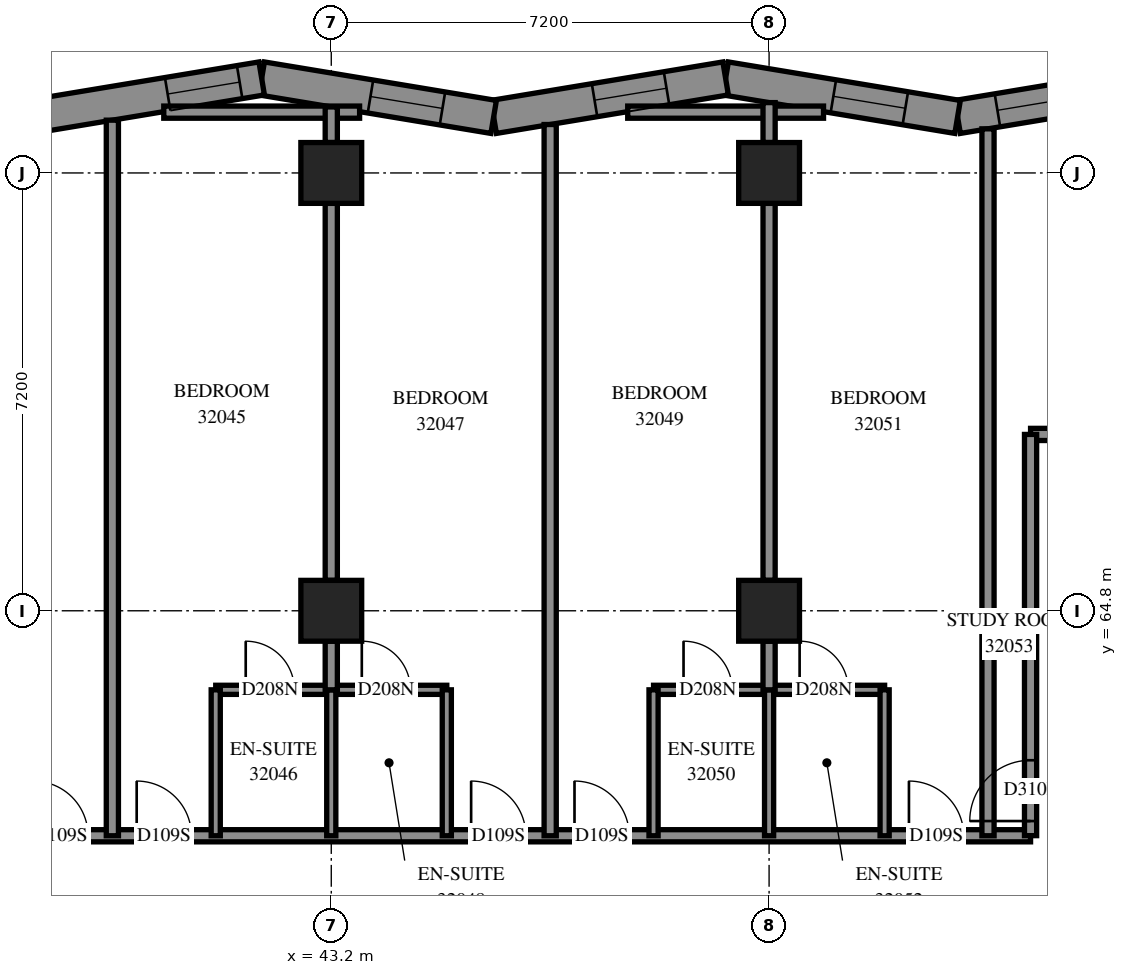
"""IFC4 building model, lengths in metres.
Left out: names, types, materials, properties, quantities, classifications, styles, units other than length and angle.
Written with IfcOpenShell. Run it as: python <this file> out.ifc"""

import sys

from ifc_helpers import new_model, si_unit, direction, frame, frame_2d, origin, origin_2d, place, context, subcontext, project, spatial, polyline, rectangle, outline, extrude, element, fill, save


model = new_model("IFC4")
c1 = context("Model", 3, precision=1e-05, world=origin(), true_north=direction((0.0, 1.0)))
c2 = subcontext(c1, "Body", "Model", "MODEL_VIEW")
j1 = project(units=[si_unit("LENGTHUNIT", "METRE"), si_unit("PLANEANGLEUNIT", "RADIAN")], contexts=[c1])
p1 = place(None, origin())
s1 = spatial("IfcSite", under=j1, at=p1, CompositionType="ELEMENT")
p2 = place(p1, origin())
s2 = spatial("IfcBuilding", under=s1, at=p2, CompositionType="ELEMENT")
p3 = place(p2, frame((0.0, 0.0, 118.6)))
s3 = spatial("IfcBuildingStorey", under=s2, at=p3, CompositionType="ELEMENT", Elevation=118.6)
for number, where, z_axis, x_axis in (
    (1, (43.2, 64.8, 0.0), (0.0, 0.0, 1.0), (1.0, 0.0, 0.0)),
    (2, (43.2, 72.0, 0.0), (0.0, 0.0, 1.0), (1.0, 0.0, 0.0)),
    (3, (50.4, 64.8, 0.0), (0.0, 0.0, 1.0), (1.0, 0.0, 0.0)),
    (4, (50.4, 72.0, 0.0), (0.0, 0.0, 1.0), (1.0, 0.0, 0.0)),
):
    element("IfcColumn", number, at=place(p3, frame(where, z_axis=z_axis, x_axis=x_axis)), inside=s3, PredefinedType="COLUMN", context=c2, shape_type="SweptSolid", body=[
        extrude(rectangle(XDim=1.0, YDim=1.0, at=origin_2d()), origin(), (0.0, 0.0, 1.0), 3.1),
    ])
p4 = place(p3, frame((57.315, 73.554, 0.0), z_axis=(0.0, 0.0, 1.0), x_axis=(-0.9865110911, -0.1636944324, 0.0)))
e5 = element("IfcWall", 5, at=p4, inside=s3, PredefinedType="SOLIDWALL", context=c2, shape_type="SweptSolid", body=[
    extrude(outline(polyline([(-0.046, -0.275), (3.821, -0.275), (3.913, 0.275), (0.046, 0.275), (-0.046, -0.275)])), origin(), (0.0, 0.0, 1.0), 3.1),
])
p5 = place(p4, frame((1.903, 0.0, 0.5)))
e6 = element("IfcOpeningElement", 6, at=p5, cuts=e5, PredefinedType="OPENING", context=c2, shape_type="SweptSolid", body=[
    extrude(rectangle(XDim=1.3, YDim=2.45, at=frame_2d((0.65, 1.225))), frame((0.0, 0.285, 0.0), z_axis=(0.0, -1.0, 0.0), x_axis=(1.0, 0.0, 0.0)), (0.0, 0.0, 1.0), 0.57),
])
p6 = place(p4, frame((0.315, 0.0, 0.5)))
e7 = element("IfcOpeningElement", 7, at=p6, cuts=e5, PredefinedType="OPENING", context=c2, shape_type="SweptSolid", body=[
    extrude(rectangle(XDim=1.2, YDim=2.45, at=frame_2d((0.6, 1.225))), frame((0.0, 0.285, 0.0), z_axis=(0.0, -1.0, 0.0), x_axis=(1.0, 0.0, 0.0)), (0.0, 0.0, 1.0), 0.57),
])
p7 = place(p3, frame((53.5, 72.921, 0.0), z_axis=(0.0, 0.0, 1.0), x_axis=(-0.9865110911, 0.1636944324, 0.0)))
e8 = element("IfcWall", 8, at=p7, inside=s3, PredefinedType="SOLIDWALL", context=c2, shape_type="SweptSolid", body=[
    extrude(outline(polyline([(0.046, -0.275), (3.913, -0.275), (3.821, 0.275), (-0.046, 0.275), (0.046, -0.275)])), origin(), (0.0, 0.0, 1.0), 3.1),
])
p8 = place(p7, frame((0.871, 0.0, 0.5)))
e9 = element("IfcOpeningElement", 9, at=p8, cuts=e8, PredefinedType="OPENING", context=c2, shape_type="SweptSolid", body=[
    extrude(rectangle(XDim=1.2, YDim=2.45, at=frame_2d((0.6, 1.225))), frame((0.0, 0.285, 0.0), z_axis=(0.0, -1.0, 0.0), x_axis=(1.0, 0.0, 0.0)), (0.0, 0.0, 1.0), 0.57),
])
p9 = place(p3, frame((49.685, 73.554, 0.0), z_axis=(0.0, 0.0, 1.0), x_axis=(-0.9865110911, -0.1636944324, 0.0)))
e10 = element("IfcWall", 10, at=p9, inside=s3, PredefinedType="SOLIDWALL", context=c2, shape_type="SweptSolid", body=[
    extrude(outline(polyline([(-0.046, -0.275), (3.821, -0.275), (3.913, 0.275), (0.046, 0.275), (-0.046, -0.275)])), origin(), (0.0, 0.0, 1.0), 3.1),
])
p10 = place(p9, frame((0.985, 0.0, 0.5)))
e11 = element("IfcOpeningElement", 11, at=p10, cuts=e10, PredefinedType="OPENING", context=c2, shape_type="SweptSolid", body=[
    extrude(rectangle(XDim=1.2, YDim=2.45, at=frame_2d((0.6, 1.225))), frame((0.0, 0.285, 0.0), z_axis=(0.0, -1.0, 0.0), x_axis=(1.0, 0.0, 0.0)), (0.0, 0.0, 1.0), 0.57),
])
p11 = place(p3, frame((45.87, 72.921, 0.0), z_axis=(0.0, 0.0, 1.0), x_axis=(-0.9865110911, 0.1636944324, 0.0)))
e12 = element("IfcWall", 12, at=p11, inside=s3, PredefinedType="SOLIDWALL", context=c2, shape_type="SweptSolid", body=[
    extrude(outline(polyline([(0.046, -0.275), (3.913, -0.275), (3.821, 0.275), (-0.046, 0.275), (0.046, -0.275)])), origin(), (0.0, 0.0, 1.0), 3.1),
])
p12 = place(p11, frame((0.854, 0.0, 0.5)))
e13 = element("IfcOpeningElement", 13, at=p12, cuts=e12, PredefinedType="OPENING", context=c2, shape_type="SweptSolid", body=[
    extrude(rectangle(XDim=1.2, YDim=2.45, at=frame_2d((0.6, 1.225))), frame((0.0, 0.285, 0.0), z_axis=(0.0, -1.0, 0.0), x_axis=(1.0, 0.0, 0.0)), (0.0, 0.0, 1.0), 0.57),
])
p13 = place(p3, frame((42.056, 73.554, 0.0), z_axis=(0.0, 0.0, 1.0), x_axis=(-0.9865110911, -0.1636944324, 0.0)))
e14 = element("IfcWall", 14, at=p13, inside=s3, PredefinedType="SOLIDWALL", context=c2, shape_type="SweptSolid", body=[
    extrude(outline(polyline([(-0.046, -0.275), (3.821, -0.275), (3.913, 0.275), (0.046, 0.275), (-0.046, -0.275)])), origin(), (0.0, 0.0, 1.0), 3.1),
])
p14 = place(p13, frame((0.367, 0.0, 0.5)))
e15 = element("IfcOpeningElement", 15, at=p14, cuts=e14, PredefinedType="OPENING", context=c2, shape_type="SweptSolid", body=[
    extrude(rectangle(XDim=1.2, YDim=2.45, at=frame_2d((0.6, 1.225))), frame((0.0, 0.285, 0.0), z_axis=(0.0, -1.0, 0.0), x_axis=(1.0, 0.0, 0.0)), (0.0, 0.0, 1.0), 0.57),
])
p15 = place(p3, frame((33.502, 61.1, 0.0), z_axis=(0.0, 0.0, 1.0), x_axis=(1.0, 0.0, 0.0)))
e16 = element("IfcWall", 16, at=p15, inside=s3, PredefinedType="PARTITIONING", context=c2, shape_type="SweptSolid", body=[
    extrude(rectangle(XDim=21.198, YDim=0.2, at=frame_2d((10.599, 0.0))), origin(), (0.0, 0.0, 1.0), 3.1),
])
p16 = place(p15, frame((4.798, 0.0, 0.0)))
e17 = element("IfcOpeningElement", 17, at=p16, cuts=e16, PredefinedType="OPENING", context=c2, shape_type="SweptSolid", body=[
    extrude(rectangle(XDim=0.9, YDim=2.1, at=frame_2d((0.45, 1.05))), frame((0.0, 0.11, 0.0), z_axis=(0.0, -1.0, 0.0), x_axis=(1.0, 0.0, 0.0)), (0.0, 0.0, 1.0), 0.22),
])
p17 = place(p15, frame((6.498, 0.0, 0.0)))
e18 = element("IfcOpeningElement", 18, at=p17, cuts=e16, PredefinedType="OPENING", context=c2, shape_type="SweptSolid", body=[
    extrude(rectangle(XDim=0.9, YDim=2.1, at=frame_2d((0.45, 1.05))), frame((0.0, 0.11, 0.0), z_axis=(0.0, -1.0, 0.0), x_axis=(1.0, 0.0, 0.0)), (0.0, 0.0, 1.0), 0.22),
])
p18 = place(p15, frame((11.998, 0.0, 0.0)))
e19 = element("IfcOpeningElement", 19, at=p18, cuts=e16, PredefinedType="OPENING", context=c2, shape_type="SweptSolid", body=[
    extrude(rectangle(XDim=0.9, YDim=2.1, at=frame_2d((0.45, 1.05))), frame((0.0, 0.11, 0.0), z_axis=(0.0, -1.0, 0.0), x_axis=(1.0, 0.0, 0.0)), (0.0, 0.0, 1.0), 0.22),
])
p19 = place(p15, frame((13.698, 0.0, 0.0)))
e20 = element("IfcOpeningElement", 20, at=p19, cuts=e16, PredefinedType="OPENING", context=c2, shape_type="SweptSolid", body=[
    extrude(rectangle(XDim=0.9, YDim=2.1, at=frame_2d((0.45, 1.05))), frame((0.0, 0.11, 0.0), z_axis=(0.0, -1.0, 0.0), x_axis=(1.0, 0.0, 0.0)), (0.0, 0.0, 1.0), 0.22),
])
p20 = place(p15, frame((19.198, 0.0, 0.0)))
e21 = element("IfcOpeningElement", 21, at=p20, cuts=e16, PredefinedType="OPENING", context=c2, shape_type="SweptSolid", body=[
    extrude(rectangle(XDim=0.9, YDim=2.1, at=frame_2d((0.45, 1.05))), frame((0.0, 0.11, 0.0), z_axis=(0.0, -1.0, 0.0), x_axis=(1.0, 0.0, 0.0)), (0.0, 0.0, 1.0), 0.22),
])
p21 = place(p3, frame((54.7, 67.7, 0.0), z_axis=(0.0, 0.0, 1.0), x_axis=(1.0, 0.0, 0.0)))
e22 = element("IfcWall", 22, at=p21, inside=s3, PredefinedType="PARTITIONING", context=c2, shape_type="SweptSolid", body=[
    extrude(rectangle(XDim=20.2, YDim=0.2, at=frame_2d((10.1, 0.0))), origin(), (0.0, 0.0, 1.0), 3.1),
])
p22 = place(p21, frame((5.2, 0.0, 0.0)))
e23 = element("IfcOpeningElement", 23, at=p22, cuts=e22, PredefinedType="OPENING", context=c2, shape_type="SweptSolid", body=[
    extrude(rectangle(XDim=0.9, YDim=2.1, at=frame_2d((0.45, 1.05))), frame((0.0, 0.11, 0.0), z_axis=(0.0, -1.0, 0.0), x_axis=(1.0, 0.0, 0.0)), (0.0, 0.0, 1.0), 0.22),
])
p23 = place(p21, frame((8.838, 0.0, 0.0)))
e24 = element("IfcOpeningElement", 24, at=p23, cuts=e22, PredefinedType="OPENING", context=c2, shape_type="SweptSolid", body=[
    extrude(rectangle(XDim=1.0, YDim=2.1, at=frame_2d((0.5, 1.05))), frame((0.0, 0.11, 0.0), z_axis=(0.0, -1.0, 0.0), x_axis=(1.0, 0.0, 0.0)), (0.0, 0.0, 1.0), 0.22),
])
p24 = place(p21, frame((14.1, 0.0, 0.0)))
e25 = element("IfcOpeningElement", 25, at=p24, cuts=e22, PredefinedType="OPENING", context=c2, shape_type="SweptSolid", body=[
    extrude(rectangle(XDim=0.9, YDim=2.1, at=frame_2d((0.45, 1.05))), frame((0.0, 0.11, 0.0), z_axis=(0.0, -1.0, 0.0), x_axis=(1.0, 0.0, 0.0)), (0.0, 0.0, 1.0), 0.22),
])
p25 = place(p3, frame((39.6, 61.1, 0.0), z_axis=(0.0, 0.0, 1.0), x_axis=(0.0, 1.0, 0.0)))
e26 = element("IfcWall", 26, at=p25, inside=s3, PredefinedType="PARTITIONING", context=c2, shape_type="SweptSolid", body=[
    extrude(rectangle(XDim=11.768, YDim=0.2, at=frame_2d((5.884, 0.0))), origin(), (0.0, 0.0, 1.0), 3.1),
])
p26 = place(p3, frame((46.8, 61.1, 0.0), z_axis=(0.0, 0.0, 1.0), x_axis=(0.0, 1.0, 0.0)))
e27 = element("IfcWall", 27, at=p26, inside=s3, PredefinedType="PARTITIONING", context=c2, shape_type="SweptSolid", body=[
    extrude(rectangle(XDim=11.697, YDim=0.2, at=frame_2d((5.848, 0.0))), origin(), (0.0, 0.0, 1.0), 3.1),
])
p27 = place(p3, frame((54.0, 61.1, 0.0), z_axis=(0.0, 0.0, 1.0), x_axis=(0.0, 1.0, 0.0)))
e28 = element("IfcWall", 28, at=p27, inside=s3, PredefinedType="PARTITIONING", context=c2, shape_type="SweptSolid", body=[
    extrude(rectangle(XDim=11.625, YDim=0.2, at=frame_2d((5.813, 0.0))), origin(), (0.0, 0.0, 1.0), 3.1),
])
p28 = place(p3, frame((54.7, 61.102, 0.0), z_axis=(0.0, 0.0, 1.0), x_axis=(0.0, 1.0, 0.0)))
e29 = element("IfcWall", 29, at=p28, inside=s3, PredefinedType="PARTITIONING", context=c2, shape_type="SweptSolid", body=[
    extrude(rectangle(XDim=6.598, YDim=0.2, at=frame_2d((3.299, 0.0))), origin(), (0.0, 0.0, 1.0), 3.1),
])
p29 = place(p28, frame((0.24, 0.0, 0.0)))
e30 = element("IfcOpeningElement", 30, at=p29, cuts=e29, PredefinedType="OPENING", context=c2, shape_type="SweptSolid", body=[
    extrude(rectangle(XDim=1.0, YDim=2.1, at=frame_2d((0.5, 1.05))), frame((0.0, 0.11, 0.0), z_axis=(0.0, -1.0, 0.0), x_axis=(1.0, 0.0, 0.0)), (0.0, 0.0, 1.0), 0.22),
])
for number, where, z_axis, x_axis in (
    (31, (43.2, 65.3, 0.0), (0.0, 0.0, 1.0), (0.0, 1.0, 0.0)),
    (32, (50.4, 65.3, 0.0), (0.0, 0.0, 1.0), (0.0, 1.0, 0.0)),
):
    element("IfcWall", number, at=place(p3, frame(where, z_axis=z_axis, x_axis=x_axis)), inside=s3, PredefinedType="PARTITIONING", context=c2, shape_type="SweptSolid", body=[
        extrude(rectangle(XDim=6.2, YDim=0.2, at=frame_2d((3.1, 0.0))), origin(), (0.0, 0.0, 1.0), 3.1),
    ])
p30 = place(p3, frame((41.3, 63.5, 0.0), z_axis=(0.0, 0.0, 1.0), x_axis=(1.0, 0.0, 0.0)))
e33 = element("IfcWall", 33, at=p30, inside=s3, PredefinedType="PARTITIONING", context=c2, shape_type="SweptSolid", body=[
    extrude(rectangle(XDim=3.8, YDim=0.15, at=frame_2d((1.9, 0.0))), origin(), (0.0, 0.0, 1.0), 3.1),
])
p31 = place(p30, frame((0.493, 0.0, 0.0)))
e34 = element("IfcOpeningElement", 34, at=p31, cuts=e33, PredefinedType="OPENING", context=c2, shape_type="SweptSolid", body=[
    extrude(rectangle(XDim=0.8, YDim=2.1, at=frame_2d((0.4, 1.05))), frame((0.0, 0.085, 0.0), z_axis=(0.0, -1.0, 0.0), x_axis=(1.0, 0.0, 0.0)), (0.0, 0.0, 1.0), 0.17),
])
p32 = place(p30, frame((2.402, 0.0, 0.0)))
e35 = element("IfcOpeningElement", 35, at=p32, cuts=e33, PredefinedType="OPENING", context=c2, shape_type="SweptSolid", body=[
    extrude(rectangle(XDim=0.8, YDim=2.1, at=frame_2d((0.4, 1.05))), frame((0.0, 0.085, 0.0), z_axis=(0.0, -1.0, 0.0), x_axis=(1.0, 0.0, 0.0)), (0.0, 0.0, 1.0), 0.17),
])
p33 = place(p3, frame((48.5, 63.5, 0.0), z_axis=(0.0, 0.0, 1.0), x_axis=(1.0, 0.0, 0.0)))
e36 = element("IfcWall", 36, at=p33, inside=s3, PredefinedType="PARTITIONING", context=c2, shape_type="SweptSolid", body=[
    extrude(rectangle(XDim=3.8, YDim=0.15, at=frame_2d((1.9, 0.0))), origin(), (0.0, 0.0, 1.0), 3.1),
])
p34 = place(p33, frame((0.493, 0.0, 0.0)))
e37 = element("IfcOpeningElement", 37, at=p34, cuts=e36, PredefinedType="OPENING", context=c2, shape_type="SweptSolid", body=[
    extrude(rectangle(XDim=0.8, YDim=2.1, at=frame_2d((0.4, 1.05))), frame((0.0, 0.085, 0.0), z_axis=(0.0, -1.0, 0.0), x_axis=(1.0, 0.0, 0.0)), (0.0, 0.0, 1.0), 0.17),
])
p35 = place(p33, frame((2.402, 0.0, 0.0)))
e38 = element("IfcOpeningElement", 38, at=p35, cuts=e36, PredefinedType="OPENING", context=c2, shape_type="SweptSolid", body=[
    extrude(rectangle(XDim=0.8, YDim=2.1, at=frame_2d((0.4, 1.05))), frame((0.0, 0.085, 0.0), z_axis=(0.0, -1.0, 0.0), x_axis=(1.0, 0.0, 0.0)), (0.0, 0.0, 1.0), 0.17),
])
for number, where, z_axis, x_axis in (
    (39, (40.446, 73.0, 0.0), (0.0, 0.0, 1.0), (1.0, 0.0, 0.0)),
    (40, (48.075, 73.0, 0.0), (0.0, 0.0, 1.0), (1.0, 0.0, 0.0)),
):
    element("IfcWall", number, at=place(p3, frame(where, z_axis=z_axis, x_axis=x_axis)), inside=s3, PredefinedType="PARTITIONING", context=c2, shape_type="SweptSolid", body=[
        extrude(rectangle(XDim=3.22, YDim=0.2, at=frame_2d((1.61, 0.0))), origin(), (0.0, 0.0, 1.0), 3.1),
    ])
for number, where, z_axis, x_axis in (
    (41, (41.3, 61.1, 0.0), (0.0, 0.0, 1.0), (0.0, 1.0, 0.0)),
    (42, (43.2, 61.1, 0.0), (0.0, 0.0, 1.0), (0.0, 1.0, 0.0)),
    (43, (45.1, 61.1, 0.0), (0.0, 0.0, 1.0), (0.0, 1.0, 0.0)),
    (44, (48.5, 61.1, 0.0), (0.0, 0.0, 1.0), (0.0, 1.0, 0.0)),
    (45, (50.4, 61.1, 0.0), (0.0, 0.0, 1.0), (0.0, 1.0, 0.0)),
    (46, (52.3, 61.1, 0.0), (0.0, 0.0, 1.0), (0.0, 1.0, 0.0)),
):
    element("IfcWall", number, at=place(p3, frame(where, z_axis=z_axis, x_axis=x_axis)), inside=s3, PredefinedType="PARTITIONING", context=c2, shape_type="SweptSolid", body=[
        extrude(rectangle(XDim=2.4, YDim=0.15, at=frame_2d((1.2, 0.0))), origin(), (0.0, 0.0, 1.0), 3.1),
    ])
for number, where, z_axis, x_axis in (
    (47, (43.2, 63.5, 0.0), (0.0, 0.0, 1.0), (0.0, 1.0, 0.0)),
    (48, (50.4, 63.5, 0.0), (0.0, 0.0, 1.0), (0.0, 1.0, 0.0)),
):
    element("IfcWall", number, at=place(p3, frame(where, z_axis=z_axis, x_axis=x_axis)), inside=s3, PredefinedType="PARTITIONING", context=c2, shape_type="SweptSolid", body=[
        extrude(rectangle(XDim=0.8, YDim=0.2, at=frame_2d((0.4, 0.0))), origin(), (0.0, 0.0, 1.0), 3.1),
    ])
p36 = place(p3, frame((43.2, 72.5, 0.0), z_axis=(0.0, 0.0, 1.0), x_axis=(0.0, 1.0, 0.0)))
e49 = element("IfcWall", 49, at=p36, inside=s3, PredefinedType="PARTITIONING", context=c2, shape_type="SweptSolid", body=[
    extrude(rectangle(XDim=0.586, YDim=0.2, at=frame_2d((0.293, 0.0))), origin(), (0.0, 0.0, 1.0), 3.1),
])
p37 = place(p3, frame((50.4, 72.5, 0.0), z_axis=(0.0, 0.0, 1.0), x_axis=(0.0, 1.0, 0.0)))
e50 = element("IfcWall", 50, at=p37, inside=s3, PredefinedType="PARTITIONING", context=c2, shape_type="SweptSolid", body=[
    extrude(rectangle(XDim=0.657, YDim=0.2, at=frame_2d((0.329, 0.0))), origin(), (0.0, 0.0, 1.0), 3.1),
])
p38 = place(p5, origin())
e51 = element("IfcWindow", 51, at=p38, inside=s3, PartitioningType="SINGLE_PANEL", PredefinedType="WINDOW", context=c2, shape_type="SweptSolid", body=[
    extrude(rectangle(XDim=1.3, YDim=2.45, at=frame_2d((0.65, 1.225))), frame((0.0, 0.155, 0.0), z_axis=(0.0, -1.0, 0.0), x_axis=(1.0, 0.0, 0.0)), (0.0, 0.0, 1.0), 0.06),
])
fill(e6, e51)
p39 = place(p8, origin())
e52 = element("IfcWindow", 52, at=p39, inside=s3, PartitioningType="SINGLE_PANEL", PredefinedType="WINDOW", context=c2, shape_type="SweptSolid", body=[
    extrude(rectangle(XDim=1.2, YDim=2.45, at=frame_2d((0.6, 1.225))), frame((0.0, 0.155, 0.0), z_axis=(0.0, -1.0, 0.0), x_axis=(1.0, 0.0, 0.0)), (0.0, 0.0, 1.0), 0.06),
])
fill(e9, e52)
p40 = place(p10, origin())
e53 = element("IfcWindow", 53, at=p40, inside=s3, PartitioningType="SINGLE_PANEL", PredefinedType="WINDOW", context=c2, shape_type="SweptSolid", body=[
    extrude(rectangle(XDim=1.2, YDim=2.45, at=frame_2d((0.6, 1.225))), frame((0.0, 0.155, 0.0), z_axis=(0.0, -1.0, 0.0), x_axis=(1.0, 0.0, 0.0)), (0.0, 0.0, 1.0), 0.06),
])
fill(e11, e53)
p41 = place(p12, origin())
e54 = element("IfcWindow", 54, at=p41, inside=s3, PartitioningType="SINGLE_PANEL", PredefinedType="WINDOW", context=c2, shape_type="SweptSolid", body=[
    extrude(rectangle(XDim=1.2, YDim=2.45, at=frame_2d((0.6, 1.225))), frame((0.0, 0.155, 0.0), z_axis=(0.0, -1.0, 0.0), x_axis=(1.0, 0.0, 0.0)), (0.0, 0.0, 1.0), 0.06),
])
fill(e13, e54)
p42 = place(p14, origin())
e55 = element("IfcWindow", 55, at=p42, inside=s3, PartitioningType="SINGLE_PANEL", PredefinedType="WINDOW", context=c2, shape_type="SweptSolid", body=[
    extrude(rectangle(XDim=1.2, YDim=2.45, at=frame_2d((0.6, 1.225))), frame((0.0, 0.155, 0.0), z_axis=(0.0, -1.0, 0.0), x_axis=(1.0, 0.0, 0.0)), (0.0, 0.0, 1.0), 0.06),
])
fill(e15, e55)
p43 = place(p16, origin())
e56 = element("IfcDoor", 56, at=p43, inside=s3, OperationType="SINGLE_SWING_RIGHT", PredefinedType="DOOR", context=c2, shape_type="SweptSolid", body=[
    extrude(rectangle(XDim=0.9, YDim=2.1, at=frame_2d((0.45, 1.05))), frame((0.0, 0.025, 0.0), z_axis=(0.0, -1.0, 0.0), x_axis=(1.0, 0.0, 0.0)), (0.0, 0.0, 1.0), 0.05),
])
fill(e17, e56)
p44 = place(p17, origin())
e57 = element("IfcDoor", 57, at=p44, inside=s3, OperationType="SINGLE_SWING_LEFT", PredefinedType="DOOR", context=c2, shape_type="SweptSolid", body=[
    extrude(rectangle(XDim=0.9, YDim=2.1, at=frame_2d((0.45, 1.05))), frame((0.0, 0.025, 0.0), z_axis=(0.0, -1.0, 0.0), x_axis=(1.0, 0.0, 0.0)), (0.0, 0.0, 1.0), 0.05),
])
fill(e18, e57)
p45 = place(p31, origin())
e58 = element("IfcDoor", 58, at=p45, inside=s3, OperationType="SINGLE_SWING_RIGHT", PredefinedType="DOOR", context=c2, shape_type="SweptSolid", body=[
    extrude(rectangle(XDim=0.8, YDim=2.1, at=frame_2d((0.4, 1.05))), frame((0.0, 0.025, 0.0), z_axis=(0.0, -1.0, 0.0), x_axis=(1.0, 0.0, 0.0)), (0.0, 0.0, 1.0), 0.05),
])
fill(e34, e58)
p46 = place(p18, origin())
e59 = element("IfcDoor", 59, at=p46, inside=s3, OperationType="SINGLE_SWING_RIGHT", PredefinedType="DOOR", context=c2, shape_type="SweptSolid", body=[
    extrude(rectangle(XDim=0.9, YDim=2.1, at=frame_2d((0.45, 1.05))), frame((0.0, 0.025, 0.0), z_axis=(0.0, -1.0, 0.0), x_axis=(1.0, 0.0, 0.0)), (0.0, 0.0, 1.0), 0.05),
])
fill(e19, e59)
p47 = place(p32, origin())
e60 = element("IfcDoor", 60, at=p47, inside=s3, OperationType="SINGLE_SWING_RIGHT", PredefinedType="DOOR", context=c2, shape_type="SweptSolid", body=[
    extrude(rectangle(XDim=0.8, YDim=2.1, at=frame_2d((0.4, 1.05))), frame((0.0, 0.025, 0.0), z_axis=(0.0, -1.0, 0.0), x_axis=(1.0, 0.0, 0.0)), (0.0, 0.0, 1.0), 0.05),
])
fill(e35, e60)
p48 = place(p19, origin())
e61 = element("IfcDoor", 61, at=p48, inside=s3, OperationType="SINGLE_SWING_LEFT", PredefinedType="DOOR", context=c2, shape_type="SweptSolid", body=[
    extrude(rectangle(XDim=0.9, YDim=2.1, at=frame_2d((0.45, 1.05))), frame((0.0, 0.025, 0.0), z_axis=(0.0, -1.0, 0.0), x_axis=(1.0, 0.0, 0.0)), (0.0, 0.0, 1.0), 0.05),
])
fill(e20, e61)
p49 = place(p34, origin())
e62 = element("IfcDoor", 62, at=p49, inside=s3, OperationType="SINGLE_SWING_RIGHT", PredefinedType="DOOR", context=c2, shape_type="SweptSolid", body=[
    extrude(rectangle(XDim=0.8, YDim=2.1, at=frame_2d((0.4, 1.05))), frame((0.0, 0.025, 0.0), z_axis=(0.0, -1.0, 0.0), x_axis=(1.0, 0.0, 0.0)), (0.0, 0.0, 1.0), 0.05),
])
fill(e37, e62)
p50 = place(p20, origin())
e63 = element("IfcDoor", 63, at=p50, inside=s3, OperationType="SINGLE_SWING_RIGHT", PredefinedType="DOOR", context=c2, shape_type="SweptSolid", body=[
    extrude(rectangle(XDim=0.9, YDim=2.1, at=frame_2d((0.45, 1.05))), frame((0.0, 0.025, 0.0), z_axis=(0.0, -1.0, 0.0), x_axis=(1.0, 0.0, 0.0)), (0.0, 0.0, 1.0), 0.05),
])
fill(e21, e63)
p51 = place(p35, origin())
e64 = element("IfcDoor", 64, at=p51, inside=s3, OperationType="SINGLE_SWING_RIGHT", PredefinedType="DOOR", context=c2, shape_type="SweptSolid", body=[
    extrude(rectangle(XDim=0.8, YDim=2.1, at=frame_2d((0.4, 1.05))), frame((0.0, 0.025, 0.0), z_axis=(0.0, -1.0, 0.0), x_axis=(1.0, 0.0, 0.0)), (0.0, 0.0, 1.0), 0.05),
])
fill(e38, e64)
p52 = place(p29, origin())
e65 = element("IfcDoor", 65, at=p52, inside=s3, OperationType="SINGLE_SWING_LEFT", PredefinedType="DOOR", context=c2, shape_type="SweptSolid", body=[
    extrude(rectangle(XDim=1.0, YDim=2.1, at=frame_2d((0.5, 1.05))), frame((0.0, 0.025, 0.0), z_axis=(0.0, -1.0, 0.0), x_axis=(1.0, 0.0, 0.0)), (0.0, 0.0, 1.0), 0.05),
])
fill(e30, e65)
save(model, sys.argv[1])
